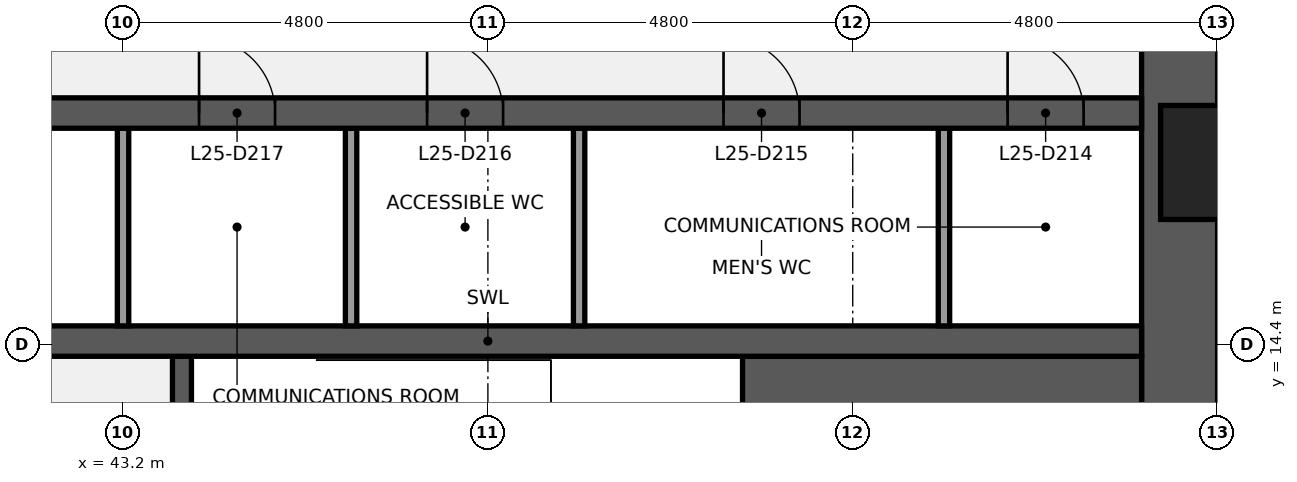
"""IFC4 building model, lengths in metres.
Left out: names, types, materials, properties, quantities, classifications, styles, units other than length and angle.
Written with IfcOpenShell. Run it as: python <this file> out.ifc"""

import sys

from ifc_helpers import new_model, si_unit, direction, frame, frame_2d, origin, place, context, subcontext, project, spatial, rectangle, extrude, element, fill, save


model = new_model("IFC4")
c1 = context("Model", 3, precision=1e-05, world=origin(), true_north=direction((0.0, 1.0)))
c2 = subcontext(c1, "Body", "Model", "MODEL_VIEW")
j1 = project(units=[si_unit("LENGTHUNIT", "METRE"), si_unit("PLANEANGLEUNIT", "RADIAN")], contexts=[c1])
p1 = place(None, origin())
s1 = spatial("IfcSite", under=j1, at=p1, CompositionType="ELEMENT")
p2 = place(p1, origin())
s2 = spatial("IfcBuilding", under=s1, at=p2, CompositionType="ELEMENT")
p3 = place(p2, frame((0.0, 0.0, 120.1)))
s3 = spatial("IfcBuildingStorey", under=s2, at=p3, CompositionType="ELEMENT", Elevation=120.1)
p4 = place(p3, frame((57.1, 38.4, 0.0), z_axis=(0.0, 0.0, 1.0), x_axis=(0.0, -1.0, 0.0)))
e1 = element("IfcWall", 1, at=p4, inside=s3, PredefinedType="SHEAR", context=c2, shape_type="SweptSolid", body=[
    extrude(rectangle(XDim=28.8, YDim=1.0, at=frame_2d((14.4, 0.0))), origin(), (0.0, 0.0, 1.0), 3.84),
])
p5 = place(p4, frame((18.45, 0.0, 0.9)))
e2 = element("IfcOpeningElement", 2, at=p5, cuts=e1, PredefinedType="OPENING", context=c2, shape_type="SweptSolid", body=[
    extrude(rectangle(XDim=1.5, YDim=1.5, at=frame_2d((0.75, 0.75))), frame((0.0, 0.51, 0.0), z_axis=(0.0, -1.0, 0.0), x_axis=(1.0, 0.0, 0.0)), (0.0, 0.0, 1.0), 1.02),
])
p6 = place(p4, frame((8.85, 0.0, 0.9)))
e3 = element("IfcOpeningElement", 3, at=p6, cuts=e1, PredefinedType="OPENING", context=c2, shape_type="SweptSolid", body=[
    extrude(rectangle(XDim=1.5, YDim=1.5, at=frame_2d((0.75, 0.75))), frame((0.0, 0.51, 0.0), z_axis=(0.0, -1.0, 0.0), x_axis=(1.0, 0.0, 0.0)), (0.0, 0.0, 1.0), 1.02),
])
p7 = place(p3, frame((51.35, 12.425, 0.0), z_axis=(0.0, 0.0, 1.0), x_axis=(1.0, 0.0, 0.0)))
e4 = element("IfcWall", 4, at=p7, inside=s3, PredefinedType="SHEAR", context=c2, shape_type="SweptSolid", body=[
    extrude(rectangle(XDim=5.25, YDim=3.65, at=frame_2d((2.625, 0.0))), origin(), (0.0, 0.0, 1.0), 3.84),
])
p8 = place(p3, frame((43.975, 10.8, 0.0), z_axis=(0.0, 0.0, 1.0), x_axis=(0.0, 1.0, 0.0)))
e5 = element("IfcWall", 5, at=p8, inside=s3, PredefinedType="SHEAR", context=c2, shape_type="SweptSolid", body=[
    extrude(rectangle(XDim=3.45, YDim=0.25, at=frame_2d((1.725, 0.0))), origin(), (0.0, 0.0, 1.0), 3.84),
])
p9 = place(p8, frame((1.175, 0.0, 0.0)))
e6 = element("IfcOpeningElement", 6, at=p9, cuts=e5, PredefinedType="OPENING", context=c2, shape_type="SweptSolid", body=[
    extrude(rectangle(XDim=1.1, YDim=2.1, at=frame_2d((0.55, 1.05))), frame((0.0, 0.135, 0.0), z_axis=(0.0, -1.0, 0.0), x_axis=(1.0, 0.0, 0.0)), (0.0, 0.0, 1.0), 0.27),
])
p10 = place(p3, frame((39.4, 14.45, 0.0), z_axis=(0.0, 0.0, 1.0), x_axis=(1.0, 0.0, 0.0)))
e7 = element("IfcWall", 7, at=p10, inside=s3, PredefinedType="SHEAR", context=c2, shape_type="SweptSolid", body=[
    extrude(rectangle(XDim=17.2, YDim=0.4, at=frame_2d((8.6, 0.0))), origin(), (0.0, 0.0, 1.0), 3.84),
])
for number, where, z_axis, x_axis in (
    (8, (54.0, 14.65, 0.0), (0.0, 0.0, 1.0), (0.0, 1.0, 0.0)),
    (9, (49.2, 14.65, 0.0), (0.0, 0.0, 1.0), (0.0, 1.0, 0.0)),
    (10, (46.2, 14.65, 0.0), (0.0, 0.0, 1.0), (0.0, 1.0, 0.0)),
    (11, (43.2, 14.65, 0.0), (0.0, 0.0, 1.0), (0.0, 1.0, 0.0)),
):
    element("IfcWall", number, at=place(p3, frame(where, z_axis=z_axis, x_axis=x_axis)), inside=s3, PredefinedType="PARTITIONING", context=c2, shape_type="SweptSolid", body=[
        extrude(rectangle(XDim=2.6, YDim=0.15, at=frame_2d((1.3, 0.0))), origin(), (0.0, 0.0, 1.0), 3.84),
    ])
p11 = place(p3, frame((39.4, 17.45, 0.0), z_axis=(0.0, 0.0, 1.0), x_axis=(1.0, 0.0, 0.0)))
e12 = element("IfcWall", 12, at=p11, inside=s3, PredefinedType="SHEAR", context=c2, shape_type="SweptSolid", body=[
    extrude(rectangle(XDim=17.2, YDim=0.4, at=frame_2d((8.6, 0.0))), origin(), (0.0, 0.0, 1.0), 3.84),
])
p12 = place(p11, frame((15.438, 0.0, 0.0)))
e13 = element("IfcOpeningElement", 13, at=p12, cuts=e12, PredefinedType="OPENING", context=c2, shape_type="SweptSolid", body=[
    extrude(rectangle(XDim=1.0, YDim=2.1, at=frame_2d((0.5, 1.05))), frame((0.0, 0.21, 0.0), z_axis=(0.0, -1.0, 0.0), x_axis=(1.0, 0.0, 0.0)), (0.0, 0.0, 1.0), 0.42),
])
p13 = place(p11, frame((11.7, 0.0, 0.0)))
e14 = element("IfcOpeningElement", 14, at=p13, cuts=e12, PredefinedType="OPENING", context=c2, shape_type="SweptSolid", body=[
    extrude(rectangle(XDim=1.0, YDim=2.1, at=frame_2d((0.5, 1.05))), frame((0.0, 0.21, 0.0), z_axis=(0.0, -1.0, 0.0), x_axis=(1.0, 0.0, 0.0)), (0.0, 0.0, 1.0), 0.42),
])
p14 = place(p11, frame((7.8, 0.0, 0.0)))
e15 = element("IfcOpeningElement", 15, at=p14, cuts=e12, PredefinedType="OPENING", context=c2, shape_type="SweptSolid", body=[
    extrude(rectangle(XDim=1.0, YDim=2.1, at=frame_2d((0.5, 1.05))), frame((0.0, 0.21, 0.0), z_axis=(0.0, -1.0, 0.0), x_axis=(1.0, 0.0, 0.0)), (0.0, 0.0, 1.0), 0.42),
])
p15 = place(p11, frame((4.8, 0.0, 0.0)))
e16 = element("IfcOpeningElement", 16, at=p15, cuts=e12, PredefinedType="OPENING", context=c2, shape_type="SweptSolid", body=[
    extrude(rectangle(XDim=1.0, YDim=2.1, at=frame_2d((0.5, 1.05))), frame((0.0, 0.21, 0.0), z_axis=(0.0, -1.0, 0.0), x_axis=(1.0, 0.0, 0.0)), (0.0, 0.0, 1.0), 0.42),
])
p16 = place(p11, frame((1.363, 0.0, 0.0)))
e17 = element("IfcOpeningElement", 17, at=p16, cuts=e12, PredefinedType="OPENING", context=c2, shape_type="SweptSolid", body=[
    extrude(rectangle(XDim=1.0, YDim=2.1, at=frame_2d((0.5, 1.05))), frame((0.0, 0.21, 0.0), z_axis=(0.0, -1.0, 0.0), x_axis=(1.0, 0.0, 0.0)), (0.0, 0.0, 1.0), 0.42),
])
p17 = place(p12, origin())
e18 = element("IfcDoor", 18, at=p17, inside=s3, OperationType="SINGLE_SWING_LEFT", PredefinedType="DOOR", context=c2, shape_type="SweptSolid", body=[
    extrude(rectangle(XDim=1.0, YDim=2.1, at=frame_2d((0.5, 1.05))), frame((0.0, 0.025, 0.0), z_axis=(0.0, -1.0, 0.0), x_axis=(1.0, 0.0, 0.0)), (0.0, 0.0, 1.0), 0.05),
])
fill(e13, e18)
p18 = place(p13, origin())
e19 = element("IfcDoor", 19, at=p18, inside=s3, OperationType="SINGLE_SWING_LEFT", PredefinedType="DOOR", context=c2, shape_type="SweptSolid", body=[
    extrude(rectangle(XDim=1.0, YDim=2.1, at=frame_2d((0.5, 1.05))), frame((0.0, 0.025, 0.0), z_axis=(0.0, -1.0, 0.0), x_axis=(1.0, 0.0, 0.0)), (0.0, 0.0, 1.0), 0.05),
])
fill(e14, e19)
p19 = place(p14, origin())
e20 = element("IfcDoor", 20, at=p19, inside=s3, OperationType="SINGLE_SWING_LEFT", PredefinedType="DOOR", context=c2, shape_type="SweptSolid", body=[
    extrude(rectangle(XDim=1.0, YDim=2.1, at=frame_2d((0.5, 1.05))), frame((0.0, 0.025, 0.0), z_axis=(0.0, -1.0, 0.0), x_axis=(1.0, 0.0, 0.0)), (0.0, 0.0, 1.0), 0.05),
])
fill(e15, e20)
p20 = place(p15, origin())
e21 = element("IfcDoor", 21, at=p20, inside=s3, OperationType="SINGLE_SWING_LEFT", PredefinedType="DOOR", context=c2, shape_type="SweptSolid", body=[
    extrude(rectangle(XDim=1.0, YDim=2.1, at=frame_2d((0.5, 1.05))), frame((0.0, 0.025, 0.0), z_axis=(0.0, -1.0, 0.0), x_axis=(1.0, 0.0, 0.0)), (0.0, 0.0, 1.0), 0.05),
])
fill(e16, e21)
save(model, sys.argv[1])
